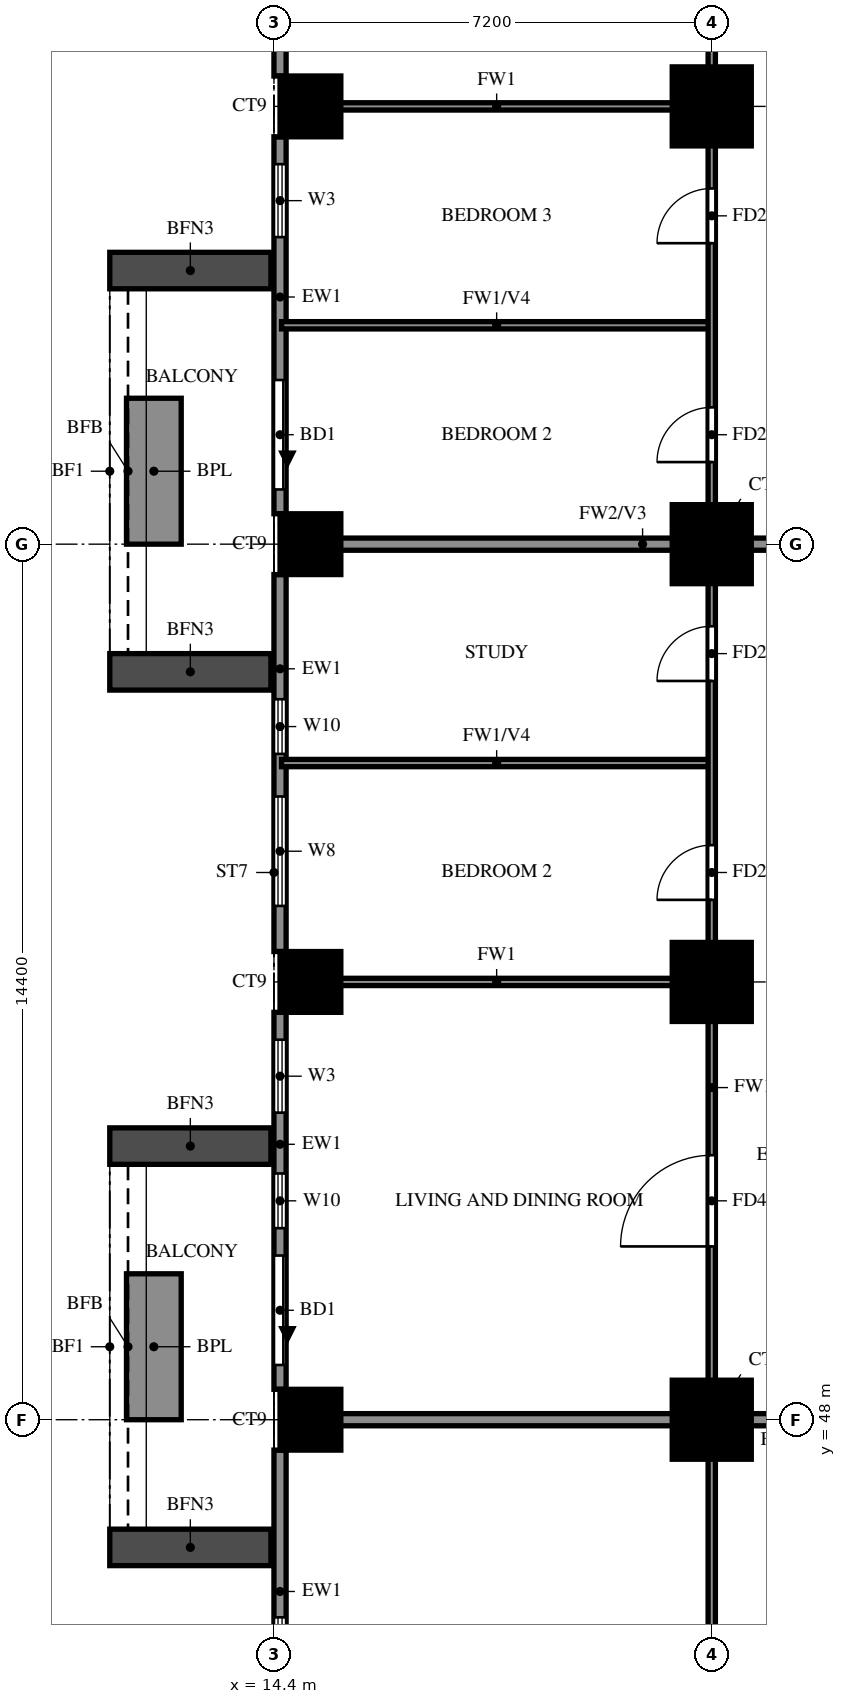
"""IFC4 building model, lengths in metres.
Left out: names, types, materials, properties, quantities, classifications, styles, units other than length and angle.
Written with IfcOpenShell. Run it as: python <this file> out.ifc"""

import sys

from ifc_helpers import new_model, si_unit, direction, frame, frame_2d, origin, origin_2d, place, context, subcontext, project, spatial, rectangle, extrude, source, transform, mapped, element, fill, save


model = new_model("IFC4")
c1 = context("Model", 3, precision=1e-05, world=origin(), true_north=direction((0.0, 1.0)))
c2 = subcontext(c1, "Body", "Model", "MODEL_VIEW")
j1 = project(units=[si_unit("LENGTHUNIT", "METRE"), si_unit("PLANEANGLEUNIT", "RADIAN")], contexts=[c1])
p1 = place(None, origin())
s1 = spatial("IfcSite", under=j1, at=p1, CompositionType="ELEMENT")
p2 = place(p1, origin())
s2 = spatial("IfcBuilding", under=s1, at=p2, CompositionType="ELEMENT")
p3 = place(p2, frame((0.0, 0.0, 76.0)))
s3 = spatial("IfcBuildingStorey", under=s2, at=p3, CompositionType="ELEMENT", Elevation=76.0)
m1 = source(origin(), c2, "Body", "SweptSolid", [
    extrude(rectangle(XDim=1.0, YDim=1.0, at=origin_2d()), origin(), (0.0, 0.0, 1.0), 3.18),
])
p4 = place(p3, frame((15.0, 48.0, 0.0), z_axis=(0.0, 0.0, 1.0), x_axis=(1.0, 0.0, 0.0)))
e1 = element("IfcColumn", 1, at=p4, inside=s3, PredefinedType="COLUMN", context=c2, shape_type="MappedRepresentation", body=[
    mapped(m1, transform((0.0, 0.0, 0.0))),
])
m2 = source(origin(), c2, "Body", "SweptSolid", [
    extrude(rectangle(XDim=1.3, YDim=1.3, at=origin_2d()), origin(), (0.0, 0.0, 1.0), 3.18),
])
p5 = place(p3, frame((21.6, 48.0, 0.0), z_axis=(0.0, 0.0, 1.0), x_axis=(1.0, 0.0, 0.0)))
e2 = element("IfcColumn", 2, at=p5, inside=s3, PredefinedType="COLUMN", context=c2, shape_type="MappedRepresentation", body=[
    mapped(m2, transform((0.0, 0.0, 0.0))),
])
p6 = place(p3, frame((15.0, 55.2, 0.0), z_axis=(0.0, 0.0, 1.0), x_axis=(1.0, 0.0, 0.0)))
e3 = element("IfcColumn", 3, at=p6, inside=s3, PredefinedType="COLUMN", context=c2, shape_type="MappedRepresentation", body=[
    mapped(m1, transform((0.0, 0.0, 0.0))),
])
p7 = place(p3, frame((21.6, 55.2, 0.0), z_axis=(0.0, 0.0, 1.0), x_axis=(1.0, 0.0, 0.0)))
e4 = element("IfcColumn", 4, at=p7, inside=s3, PredefinedType="COLUMN", context=c2, shape_type="MappedRepresentation", body=[
    mapped(m2, transform((0.0, 0.0, 0.0))),
])
p8 = place(p3, frame((15.0, 62.4, 0.0), z_axis=(0.0, 0.0, 1.0), x_axis=(1.0, 0.0, 0.0)))
e5 = element("IfcColumn", 5, at=p8, inside=s3, PredefinedType="COLUMN", context=c2, shape_type="MappedRepresentation", body=[
    mapped(m1, transform((0.0, 0.0, 0.0))),
])
p9 = place(p3, frame((21.6, 62.4, 0.0), z_axis=(0.0, 0.0, 1.0), x_axis=(1.0, 0.0, 0.0)))
e6 = element("IfcColumn", 6, at=p9, inside=s3, PredefinedType="COLUMN", context=c2, shape_type="MappedRepresentation", body=[
    mapped(m2, transform((0.0, 0.0, 0.0))),
])
p10 = place(p3, frame((15.0, 69.6, 0.0), z_axis=(0.0, 0.0, 1.0), x_axis=(1.0, 0.0, 0.0)))
e7 = element("IfcColumn", 7, at=p10, inside=s3, PredefinedType="COLUMN", context=c2, shape_type="MappedRepresentation", body=[
    mapped(m1, transform((0.0, 0.0, 0.0))),
])
p11 = place(p3, frame((21.6, 69.6, 0.0), z_axis=(0.0, 0.0, 1.0), x_axis=(1.0, 0.0, 0.0)))
e8 = element("IfcColumn", 8, at=p11, inside=s3, PredefinedType="COLUMN", context=c2, shape_type="MappedRepresentation", body=[
    mapped(m2, transform((0.0, 0.0, 0.0))),
])
p12 = place(p3, frame((14.5, 76.3, 0.0), z_axis=(0.0, 0.0, 1.0), x_axis=(0.0, -1.0, 0.0)))
e9 = element("IfcWall", 9, at=p12, inside=s3, PredefinedType="SOLIDWALL", context=c2, shape_type="SweptSolid", body=[
    extrude(rectangle(XDim=6.2, YDim=0.2, at=frame_2d((3.1, 0.0))), origin(), (0.0, 0.0, 1.0), 3.18),
])
p13 = place(p12, frame((3.65, 0.0, 0.6)))
e10 = element("IfcOpeningElement", 10, at=p13, cuts=e9, PredefinedType="OPENING", context=c2, shape_type="SweptSolid", body=[
    extrude(rectangle(XDim=1.8, YDim=2.4, at=frame_2d((0.9, 1.2))), frame((0.0, 0.11, 0.0), z_axis=(0.0, -1.0, 0.0), x_axis=(1.0, 0.0, 0.0)), (0.0, 0.0, 1.0), 0.22),
])
p14 = place(p12, frame((0.75, 0.0, 0.6)))
e11 = element("IfcOpeningElement", 11, at=p14, cuts=e9, PredefinedType="OPENING", context=c2, shape_type="SweptSolid", body=[
    extrude(rectangle(XDim=1.8, YDim=2.4, at=frame_2d((0.9, 1.2))), frame((0.0, 0.11, 0.0), z_axis=(0.0, -1.0, 0.0), x_axis=(1.0, 0.0, 0.0)), (0.0, 0.0, 1.0), 0.22),
])
p15 = place(p3, frame((14.5, 69.1, 0.0), z_axis=(0.0, 0.0, 1.0), x_axis=(0.0, -1.0, 0.0)))
e12 = element("IfcWall", 12, at=p15, inside=s3, PredefinedType="SOLIDWALL", context=c2, shape_type="SweptSolid", body=[
    extrude(rectangle(XDim=6.2, YDim=0.2, at=frame_2d((3.1, 0.0))), origin(), (0.0, 0.0, 1.0), 3.18),
])
p16 = place(p15, frame((4.0, 0.0, 0.0)))
e13 = element("IfcOpeningElement", 13, at=p16, cuts=e12, PredefinedType="OPENING", context=c2, shape_type="SweptSolid", body=[
    extrude(rectangle(XDim=1.8, YDim=2.4, at=frame_2d((0.9, 1.2))), frame((0.0, 0.11, 0.0), z_axis=(0.0, -1.0, 0.0), x_axis=(1.0, 0.0, 0.0)), (0.0, 0.0, 1.0), 0.22),
])
p17 = place(p15, frame((0.45, 0.0, 0.6)))
e14 = element("IfcOpeningElement", 14, at=p17, cuts=e12, PredefinedType="OPENING", context=c2, shape_type="SweptSolid", body=[
    extrude(rectangle(XDim=1.2, YDim=2.4, at=frame_2d((0.6, 1.2))), frame((0.0, 0.11, 0.0), z_axis=(0.0, -1.0, 0.0), x_axis=(1.0, 0.0, 0.0)), (0.0, 0.0, 1.0), 0.22),
])
p18 = place(p3, frame((14.5, 61.9, 0.0), z_axis=(0.0, 0.0, 1.0), x_axis=(0.0, -1.0, 0.0)))
e15 = element("IfcWall", 15, at=p18, inside=s3, PredefinedType="SOLIDWALL", context=c2, shape_type="SweptSolid", body=[
    extrude(rectangle(XDim=6.2, YDim=0.2, at=frame_2d((3.1, 0.0))), origin(), (0.0, 0.0, 1.0), 3.18),
])
p19 = place(p18, frame((3.65, 0.0, 0.6)))
e16 = element("IfcOpeningElement", 16, at=p19, cuts=e15, PredefinedType="OPENING", context=c2, shape_type="SweptSolid", body=[
    extrude(rectangle(XDim=1.8, YDim=2.4, at=frame_2d((0.9, 1.2))), frame((0.0, 0.11, 0.0), z_axis=(0.0, -1.0, 0.0), x_axis=(1.0, 0.0, 0.0)), (0.0, 0.0, 1.0), 0.22),
])
p20 = place(p18, frame((2.05, 0.0, 0.6)))
e17 = element("IfcOpeningElement", 17, at=p20, cuts=e15, PredefinedType="OPENING", context=c2, shape_type="SweptSolid", body=[
    extrude(rectangle(XDim=0.9, YDim=2.4, at=frame_2d((0.45, 1.2))), frame((0.0, 0.11, 0.0), z_axis=(0.0, -1.0, 0.0), x_axis=(1.0, 0.0, 0.0)), (0.0, 0.0, 1.0), 0.22),
])
p21 = place(p3, frame((14.5, 54.7, 0.0), z_axis=(0.0, 0.0, 1.0), x_axis=(0.0, -1.0, 0.0)))
e18 = element("IfcWall", 18, at=p21, inside=s3, PredefinedType="SOLIDWALL", context=c2, shape_type="SweptSolid", body=[
    extrude(rectangle(XDim=6.2, YDim=0.2, at=frame_2d((3.1, 0.0))), origin(), (0.0, 0.0, 1.0), 3.18),
])
p22 = place(p21, frame((4.0, 0.0, 0.0)))
e19 = element("IfcOpeningElement", 19, at=p22, cuts=e18, PredefinedType="OPENING", context=c2, shape_type="SweptSolid", body=[
    extrude(rectangle(XDim=1.8, YDim=2.4, at=frame_2d((0.9, 1.2))), frame((0.0, 0.11, 0.0), z_axis=(0.0, -1.0, 0.0), x_axis=(1.0, 0.0, 0.0)), (0.0, 0.0, 1.0), 0.22),
])
p23 = place(p21, frame((0.45, 0.0, 0.6)))
e20 = element("IfcOpeningElement", 20, at=p23, cuts=e18, PredefinedType="OPENING", context=c2, shape_type="SweptSolid", body=[
    extrude(rectangle(XDim=1.2, YDim=2.4, at=frame_2d((0.6, 1.2))), frame((0.0, 0.11, 0.0), z_axis=(0.0, -1.0, 0.0), x_axis=(1.0, 0.0, 0.0)), (0.0, 0.0, 1.0), 0.22),
])
p24 = place(p21, frame((2.65, 0.0, 0.6)))
e21 = element("IfcOpeningElement", 21, at=p24, cuts=e18, PredefinedType="OPENING", context=c2, shape_type="SweptSolid", body=[
    extrude(rectangle(XDim=0.9, YDim=2.4, at=frame_2d((0.45, 1.2))), frame((0.0, 0.11, 0.0), z_axis=(0.0, -1.0, 0.0), x_axis=(1.0, 0.0, 0.0)), (0.0, 0.0, 1.0), 0.22),
])
p25 = place(p3, frame((14.5, 47.5, 0.0), z_axis=(0.0, 0.0, 1.0), x_axis=(0.0, -1.0, 0.0)))
e22 = element("IfcWall", 22, at=p25, inside=s3, PredefinedType="SOLIDWALL", context=c2, shape_type="SweptSolid", body=[
    extrude(rectangle(XDim=6.2, YDim=0.2, at=frame_2d((3.1, 0.0))), origin(), (0.0, 0.0, 1.0), 3.18),
])
p26 = place(p25, frame((2.75, 0.0, 0.6)))
e23 = element("IfcOpeningElement", 23, at=p26, cuts=e22, PredefinedType="OPENING", context=c2, shape_type="SweptSolid", body=[
    extrude(rectangle(XDim=2.4, YDim=2.4, at=frame_2d((1.2, 1.2))), frame((0.0, 0.11, 0.0), z_axis=(0.0, -1.0, 0.0), x_axis=(1.0, 0.0, 0.0)), (0.0, 0.0, 1.0), 0.22),
])
for number, where, z_axis, x_axis in (
    (24, (14.35, 66.9, 0.0), (0.0, 0.0, 1.0), (-1.0, 0.0, 0.0)),
    (25, (14.35, 60.3, 0.0), (0.0, 0.0, 1.0), (-1.0, 0.0, 0.0)),
):
    element("IfcWall", number, at=place(p3, frame(where, z_axis=z_axis, x_axis=x_axis)), inside=s3, PredefinedType="SOLIDWALL", context=c2, shape_type="SweptSolid", body=[
        extrude(rectangle(XDim=2.65, YDim=0.6, at=frame_2d((1.325, 0.0))), origin(), (0.0, 0.0, 1.0), 2.85),
    ])
p27 = place(p3, frame((12.425, 64.8, 0.0), z_axis=(0.0, 0.0, 1.0), x_axis=(0.0, -1.0, 0.0)))
e26 = element("IfcWall", 26, at=p27, inside=s3, PredefinedType="SOLIDWALL", context=c2, shape_type="SweptSolid", body=[
    extrude(rectangle(XDim=2.4, YDim=0.9, at=frame_2d((1.2, 0.0))), origin(), (0.0, 0.0, 1.0), 0.9),
])
for number, where, z_axis, x_axis in (
    (27, (14.35, 52.5, 0.0), (0.0, 0.0, 1.0), (-1.0, 0.0, 0.0)),
    (28, (14.35, 45.9, 0.0), (0.0, 0.0, 1.0), (-1.0, 0.0, 0.0)),
):
    element("IfcWall", number, at=place(p3, frame(where, z_axis=z_axis, x_axis=x_axis)), inside=s3, PredefinedType="SOLIDWALL", context=c2, shape_type="SweptSolid", body=[
        extrude(rectangle(XDim=2.65, YDim=0.6, at=frame_2d((1.325, 0.0))), origin(), (0.0, 0.0, 1.0), 2.85),
    ])
p28 = place(p3, frame((12.425, 50.4, 0.0), z_axis=(0.0, 0.0, 1.0), x_axis=(0.0, -1.0, 0.0)))
e29 = element("IfcWall", 29, at=p28, inside=s3, PredefinedType="SOLIDWALL", context=c2, shape_type="SweptSolid", body=[
    extrude(rectangle(XDim=2.4, YDim=0.9, at=frame_2d((1.2, 0.0))), origin(), (0.0, 0.0, 1.0), 0.9),
])
p29 = place(p3, frame((14.525, 48.0, 0.0), z_axis=(0.0, 0.0, 1.0), x_axis=(1.0, 0.0, 0.0)))
e30 = element("IfcWall", 30, at=p29, inside=s3, PredefinedType="SOLIDWALL", context=c2, shape_type="SweptSolid", body=[
    extrude(rectangle(XDim=14.275, YDim=0.2, at=frame_2d((7.138, 0.0))), origin(), (0.0, 0.0, 1.0), 3.18),
])
p30 = place(p3, frame((14.525, 62.4, 0.0), z_axis=(0.0, 0.0, 1.0), x_axis=(1.0, 0.0, 0.0)))
e31 = element("IfcWall", 31, at=p30, inside=s3, PredefinedType="SOLIDWALL", context=c2, shape_type="SweptSolid", body=[
    extrude(rectangle(XDim=11.875, YDim=0.2, at=frame_2d((5.938, 0.0))), origin(), (0.0, 0.0, 1.0), 3.18),
])
p31 = place(p3, frame((14.525, 55.2, 0.0), z_axis=(0.0, 0.0, 1.0), x_axis=(1.0, 0.0, 0.0)))
e32 = element("IfcWall", 32, at=p31, inside=s3, PredefinedType="PARTITIONING", context=c2, shape_type="SweptSolid", body=[
    extrude(rectangle(XDim=7.075, YDim=0.12, at=frame_2d((3.538, 0.0))), origin(), (0.0, 0.0, 1.0), 3.18),
])
for number, where, z_axis, x_axis in (
    (33, (14.525, 58.8, 0.0), (0.0, 0.0, 1.0), (1.0, 0.0, 0.0)),
    (34, (14.525, 66.0, 0.0), (0.0, 0.0, 1.0), (1.0, 0.0, 0.0)),
):
    element("IfcWall", number, at=place(p3, frame(where, z_axis=z_axis, x_axis=x_axis)), inside=s3, PredefinedType="PARTITIONING", context=c2, shape_type="SweptSolid", body=[
        extrude(rectangle(XDim=7.075, YDim=0.12, at=frame_2d((3.538, 0.0))), origin(), (0.0, 0.0, 1.0), 2.28),
    ])
p32 = place(p3, frame((14.525, 69.6, 0.0), z_axis=(0.0, 0.0, 1.0), x_axis=(1.0, 0.0, 0.0)))
e35 = element("IfcWall", 35, at=p32, inside=s3, PredefinedType="PARTITIONING", context=c2, shape_type="SweptSolid", body=[
    extrude(rectangle(XDim=7.075, YDim=0.12, at=frame_2d((3.538, 0.0))), origin(), (0.0, 0.0, 1.0), 3.18),
])
p33 = place(p3, frame((21.6, 33.725, 0.0), z_axis=(0.0, 0.0, 1.0), x_axis=(0.0, 1.0, 0.0)))
e36 = element("IfcWall", 36, at=p33, inside=s3, PredefinedType="PARTITIONING", context=c2, shape_type="SweptSolid", body=[
    extrude(rectangle(XDim=39.475, YDim=0.12, at=frame_2d((19.737, 0.0))), origin(), (0.0, 0.0, 1.0), 3.18),
])
p34 = place(p33, frame((7.775, 0.0, 0.0)))
e37 = element("IfcOpeningElement", 37, at=p34, cuts=e36, PredefinedType="OPENING", context=c2, shape_type="SweptSolid", body=[
    extrude(rectangle(XDim=0.9, YDim=2.1, at=frame_2d((0.45, 1.05))), frame((0.0, 0.07, 0.0), z_axis=(0.0, -1.0, 0.0), x_axis=(1.0, 0.0, 0.0)), (0.0, 0.0, 1.0), 0.14),
])
p35 = place(p33, frame((17.125, 0.0, 0.0)))
e38 = element("IfcOpeningElement", 38, at=p35, cuts=e36, PredefinedType="OPENING", context=c2, shape_type="SweptSolid", body=[
    extrude(rectangle(XDim=1.5, YDim=2.1, at=frame_2d((0.75, 1.05))), frame((0.0, 0.07, 0.0), z_axis=(0.0, -1.0, 0.0), x_axis=(1.0, 0.0, 0.0)), (0.0, 0.0, 1.0), 0.14),
])
p36 = place(p33, frame((22.825, 0.0, 0.0)))
e39 = element("IfcOpeningElement", 39, at=p36, cuts=e36, PredefinedType="OPENING", context=c2, shape_type="SweptSolid", body=[
    extrude(rectangle(XDim=0.9, YDim=2.1, at=frame_2d((0.45, 1.05))), frame((0.0, 0.07, 0.0), z_axis=(0.0, -1.0, 0.0), x_axis=(1.0, 0.0, 0.0)), (0.0, 0.0, 1.0), 0.14),
])
p37 = place(p33, frame((26.425, 0.0, 0.0)))
e40 = element("IfcOpeningElement", 40, at=p37, cuts=e36, PredefinedType="OPENING", context=c2, shape_type="SweptSolid", body=[
    extrude(rectangle(XDim=0.9, YDim=2.1, at=frame_2d((0.45, 1.05))), frame((0.0, 0.07, 0.0), z_axis=(0.0, -1.0, 0.0), x_axis=(1.0, 0.0, 0.0)), (0.0, 0.0, 1.0), 0.14),
])
p38 = place(p33, frame((30.025, 0.0, 0.0)))
e41 = element("IfcOpeningElement", 41, at=p38, cuts=e36, PredefinedType="OPENING", context=c2, shape_type="SweptSolid", body=[
    extrude(rectangle(XDim=0.9, YDim=2.1, at=frame_2d((0.45, 1.05))), frame((0.0, 0.07, 0.0), z_axis=(0.0, -1.0, 0.0), x_axis=(1.0, 0.0, 0.0)), (0.0, 0.0, 1.0), 0.14),
])
p39 = place(p33, frame((33.625, 0.0, 0.0)))
e42 = element("IfcOpeningElement", 42, at=p39, cuts=e36, PredefinedType="OPENING", context=c2, shape_type="SweptSolid", body=[
    extrude(rectangle(XDim=0.9, YDim=2.1, at=frame_2d((0.45, 1.05))), frame((0.0, 0.07, 0.0), z_axis=(0.0, -1.0, 0.0), x_axis=(1.0, 0.0, 0.0)), (0.0, 0.0, 1.0), 0.14),
])
p40 = place(p33, frame((37.225, 0.0, 0.0)))
e43 = element("IfcOpeningElement", 43, at=p40, cuts=e36, PredefinedType="OPENING", context=c2, shape_type="SweptSolid", body=[
    extrude(rectangle(XDim=0.9, YDim=2.1, at=frame_2d((0.45, 1.05))), frame((0.0, 0.07, 0.0), z_axis=(0.0, -1.0, 0.0), x_axis=(1.0, 0.0, 0.0)), (0.0, 0.0, 1.0), 0.14),
])
p41 = place(p16, origin())
e44 = element("IfcDoor", 44, at=p41, inside=s3, OperationType="DOUBLE_DOOR_SLIDING", PredefinedType="DOOR", context=c2, shape_type="SweptSolid", body=[
    extrude(rectangle(XDim=1.8, YDim=2.4, at=frame_2d((0.9, 1.2))), frame((0.0, 0.025, 0.0), z_axis=(0.0, -1.0, 0.0), x_axis=(1.0, 0.0, 0.0)), (0.0, 0.0, 1.0), 0.05),
])
fill(e13, e44)
p42 = place(p17, origin())
e45 = element("IfcWindow", 45, at=p42, inside=s3, PartitioningType="SINGLE_PANEL", PredefinedType="WINDOW", context=c2, shape_type="SweptSolid", body=[
    extrude(rectangle(XDim=1.2, YDim=2.4, at=frame_2d((0.6, 1.2))), frame((0.0, 0.03, 0.0), z_axis=(0.0, -1.0, 0.0), x_axis=(1.0, 0.0, 0.0)), (0.0, 0.0, 1.0), 0.06),
])
fill(e14, e45)
p43 = place(p19, origin())
e46 = element("IfcWindow", 46, at=p43, inside=s3, PartitioningType="DOUBLE_PANEL_VERTICAL", PredefinedType="WINDOW", context=c2, shape_type="SweptSolid", body=[
    extrude(rectangle(XDim=1.8, YDim=2.4, at=frame_2d((0.9, 1.2))), frame((0.0, 0.03, 0.0), z_axis=(0.0, -1.0, 0.0), x_axis=(1.0, 0.0, 0.0)), (0.0, 0.0, 1.0), 0.06),
])
fill(e16, e46)
p44 = place(p20, origin())
e47 = element("IfcWindow", 47, at=p44, inside=s3, PartitioningType="SINGLE_PANEL", PredefinedType="WINDOW", context=c2, shape_type="SweptSolid", body=[
    extrude(rectangle(XDim=0.9, YDim=2.4, at=frame_2d((0.45, 1.2))), frame((0.0, 0.03, 0.0), z_axis=(0.0, -1.0, 0.0), x_axis=(1.0, 0.0, 0.0)), (0.0, 0.0, 1.0), 0.06),
])
fill(e17, e47)
p45 = place(p22, origin())
e48 = element("IfcDoor", 48, at=p45, inside=s3, OperationType="DOUBLE_DOOR_SLIDING", PredefinedType="DOOR", context=c2, shape_type="SweptSolid", body=[
    extrude(rectangle(XDim=1.8, YDim=2.4, at=frame_2d((0.9, 1.2))), frame((0.0, 0.025, 0.0), z_axis=(0.0, -1.0, 0.0), x_axis=(1.0, 0.0, 0.0)), (0.0, 0.0, 1.0), 0.05),
])
fill(e19, e48)
p46 = place(p23, origin())
e49 = element("IfcWindow", 49, at=p46, inside=s3, PartitioningType="SINGLE_PANEL", PredefinedType="WINDOW", context=c2, shape_type="SweptSolid", body=[
    extrude(rectangle(XDim=1.2, YDim=2.4, at=frame_2d((0.6, 1.2))), frame((0.0, 0.03, 0.0), z_axis=(0.0, -1.0, 0.0), x_axis=(1.0, 0.0, 0.0)), (0.0, 0.0, 1.0), 0.06),
])
fill(e20, e49)
p47 = place(p24, origin())
e50 = element("IfcWindow", 50, at=p47, inside=s3, PartitioningType="SINGLE_PANEL", PredefinedType="WINDOW", context=c2, shape_type="SweptSolid", body=[
    extrude(rectangle(XDim=0.9, YDim=2.4, at=frame_2d((0.45, 1.2))), frame((0.0, 0.03, 0.0), z_axis=(0.0, -1.0, 0.0), x_axis=(1.0, 0.0, 0.0)), (0.0, 0.0, 1.0), 0.06),
])
fill(e21, e50)
p48 = place(p26, origin())
e51 = element("IfcWindow", 51, at=p48, inside=s3, PartitioningType="DOUBLE_PANEL_VERTICAL", PredefinedType="WINDOW", context=c2, shape_type="SweptSolid", body=[
    extrude(rectangle(XDim=2.4, YDim=2.4, at=frame_2d((1.2, 1.2))), frame((0.0, 0.03, 0.0), z_axis=(0.0, -1.0, 0.0), x_axis=(1.0, 0.0, 0.0)), (0.0, 0.0, 1.0), 0.06),
])
fill(e23, e51)
p49 = place(p35, origin())
e52 = element("IfcDoor", 52, at=p49, inside=s3, OperationType="SINGLE_SWING_LEFT", PredefinedType="DOOR", context=c2, shape_type="SweptSolid", body=[
    extrude(rectangle(XDim=1.5, YDim=2.1, at=frame_2d((0.75, 1.05))), frame((0.0, 0.025, 0.0), z_axis=(0.0, -1.0, 0.0), x_axis=(1.0, 0.0, 0.0)), (0.0, 0.0, 1.0), 0.05),
])
fill(e38, e52)
p50 = place(p36, origin())
e53 = element("IfcDoor", 53, at=p50, inside=s3, OperationType="SINGLE_SWING_RIGHT", PredefinedType="DOOR", context=c2, shape_type="SweptSolid", body=[
    extrude(rectangle(XDim=0.9, YDim=2.1, at=frame_2d((0.45, 1.05))), frame((0.0, 0.025, 0.0), z_axis=(0.0, -1.0, 0.0), x_axis=(1.0, 0.0, 0.0)), (0.0, 0.0, 1.0), 0.05),
])
fill(e39, e53)
p51 = place(p37, origin())
e54 = element("IfcDoor", 54, at=p51, inside=s3, OperationType="SINGLE_SWING_LEFT", PredefinedType="DOOR", context=c2, shape_type="SweptSolid", body=[
    extrude(rectangle(XDim=0.9, YDim=2.1, at=frame_2d((0.45, 1.05))), frame((0.0, 0.025, 0.0), z_axis=(0.0, -1.0, 0.0), x_axis=(1.0, 0.0, 0.0)), (0.0, 0.0, 1.0), 0.05),
])
fill(e40, e54)
p52 = place(p38, origin())
e55 = element("IfcDoor", 55, at=p52, inside=s3, OperationType="SINGLE_SWING_RIGHT", PredefinedType="DOOR", context=c2, shape_type="SweptSolid", body=[
    extrude(rectangle(XDim=0.9, YDim=2.1, at=frame_2d((0.45, 1.05))), frame((0.0, 0.025, 0.0), z_axis=(0.0, -1.0, 0.0), x_axis=(1.0, 0.0, 0.0)), (0.0, 0.0, 1.0), 0.05),
])
fill(e41, e55)
p53 = place(p39, origin())
e56 = element("IfcDoor", 56, at=p53, inside=s3, OperationType="SINGLE_SWING_LEFT", PredefinedType="DOOR", context=c2, shape_type="SweptSolid", body=[
    extrude(rectangle(XDim=0.9, YDim=2.1, at=frame_2d((0.45, 1.05))), frame((0.0, 0.025, 0.0), z_axis=(0.0, -1.0, 0.0), x_axis=(1.0, 0.0, 0.0)), (0.0, 0.0, 1.0), 0.05),
])
fill(e42, e56)
save(model, sys.argv[1])
